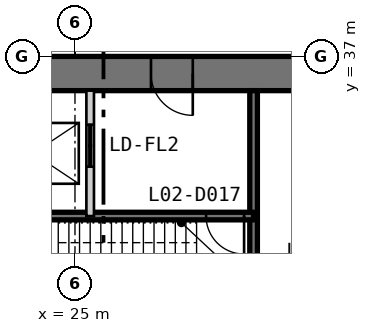
"""IFC4 building model, lengths in metres.
Left out: names, types, materials, properties, quantities, classifications, styles, units other than length and angle.
Written with IfcOpenShell. Run it as: python <this file> out.ifc"""

import sys

from ifc_helpers import new_model, si_unit, direction, frame, frame_2d, origin, place, context, subcontext, project, spatial, polyline, rectangle, outline, extrude, element, fill, save


model = new_model("IFC4")
c1 = context("Model", 3, precision=1e-05, world=origin(), true_north=direction((0.0, 1.0)))
c2 = subcontext(c1, "Body", "Model", "MODEL_VIEW")
j1 = project(units=[si_unit("LENGTHUNIT", "METRE"), si_unit("PLANEANGLEUNIT", "RADIAN")], contexts=[c1])
p1 = place(None, origin())
s1 = spatial("IfcSite", under=j1, at=p1, CompositionType="ELEMENT")
p2 = place(p1, origin())
s2 = spatial("IfcBuilding", under=s1, at=p2, CompositionType="ELEMENT")
p3 = place(p2, frame((0.0, 0.0, 11.8)))
s3 = spatial("IfcBuildingStorey", under=s2, at=p3, CompositionType="ELEMENT", Elevation=11.8)
p4 = place(p3, frame((37.0, 36.55, 0.0), z_axis=(0.0, 0.0, 1.0), x_axis=(-1.0, 0.0, 0.0)))
e1 = element("IfcWall", 1, at=p4, inside=s3, PredefinedType="SHEAR", context=c2, shape_type="SweptSolid", body=[
    extrude(outline(polyline([(0.0, -0.45), (24.0, -0.45), (23.1, 0.45), (0.9, 0.45), (0.0, -0.45)])), origin(), (0.0, 0.0, 1.0), 4.8),
])
p5 = place(p4, frame((4.9, 0.0, 0.0)))
e2 = element("IfcOpeningElement", 2, at=p5, cuts=e1, PredefinedType="OPENING", context=c2, shape_type="SweptSolid", body=[
    extrude(rectangle(XDim=1.0, YDim=2.2, at=frame_2d((0.5, 1.1))), frame((0.0, 0.46, 0.0), z_axis=(0.0, -1.0, 0.0), x_axis=(1.0, 0.0, 0.0)), (0.0, 0.0, 1.0), 0.92),
])
p6 = place(p4, frame((8.9, 0.0, 0.0)))
e3 = element("IfcOpeningElement", 3, at=p6, cuts=e1, PredefinedType="OPENING", context=c2, shape_type="SweptSolid", body=[
    extrude(rectangle(XDim=1.1, YDim=2.2, at=frame_2d((0.55, 1.1))), frame((0.0, 0.46, 0.0), z_axis=(0.0, -1.0, 0.0), x_axis=(1.0, 0.0, 0.0)), (0.0, 0.0, 1.0), 0.92),
])
p7 = place(p4, frame((15.05, 0.0, 0.0)))
e4 = element("IfcOpeningElement", 4, at=p7, cuts=e1, PredefinedType="OPENING", context=c2, shape_type="SweptSolid", body=[
    extrude(rectangle(XDim=0.9, YDim=2.2, at=frame_2d((0.45, 1.1))), frame((0.0, 0.46, 0.0), z_axis=(0.0, -1.0, 0.0), x_axis=(1.0, 0.0, 0.0)), (0.0, 0.0, 1.0), 0.92),
])
p8 = place(p4, frame((17.9, 0.0, 0.0)))
e5 = element("IfcOpeningElement", 5, at=p8, cuts=e1, PredefinedType="OPENING", context=c2, shape_type="SweptSolid", body=[
    extrude(rectangle(XDim=1.0, YDim=2.2, at=frame_2d((0.5, 1.1))), frame((0.0, 0.46, 0.0), z_axis=(0.0, -1.0, 0.0), x_axis=(1.0, 0.0, 0.0)), (0.0, 0.0, 1.0), 0.92),
])
p9 = place(p4, frame((21.4, 0.0, 0.0)))
e6 = element("IfcOpeningElement", 6, at=p9, cuts=e1, PredefinedType="OPENING", context=c2, shape_type="SweptSolid", body=[
    extrude(rectangle(XDim=1.0, YDim=2.2, at=frame_2d((0.5, 1.1))), frame((0.0, 0.46, 0.0), z_axis=(0.0, -1.0, 0.0), x_axis=(1.0, 0.0, 0.0)), (0.0, 0.0, 1.0), 0.92),
])
p10 = place(p3, frame((29.7, 36.1, 0.0), z_axis=(0.0, 0.0, 1.0), x_axis=(0.0, -1.0, 0.0)))
e7 = element("IfcWall", 7, at=p10, inside=s3, PredefinedType="SOLIDWALL", context=c2, shape_type="SweptSolid", body=[
    extrude(rectangle(XDim=16.1, YDim=0.2, at=frame_2d((8.05, 0.0))), origin(), (0.0, 0.0, 1.0), 4.6),
])
p11 = place(p3, frame((29.7, 32.8, 0.0), z_axis=(0.0, 0.0, 1.0), x_axis=(-1.0, 0.0, 0.0)))
e8 = element("IfcWall", 8, at=p11, inside=s3, PredefinedType="SOLIDWALL", context=c2, shape_type="SweptSolid", body=[
    extrude(rectangle(XDim=9.4, YDim=0.2, at=frame_2d((4.7, 0.0))), origin(), (0.0, 0.0, 1.0), 4.6),
])
p12 = place(p11, frame((0.25, 0.0, 0.0)))
e9 = element("IfcOpeningElement", 9, at=p12, cuts=e8, PredefinedType="OPENING", context=c2, shape_type="SweptSolid", body=[
    extrude(rectangle(XDim=1.0, YDim=2.2, at=frame_2d((0.5, 1.1))), frame((0.0, 0.11, 0.0), z_axis=(0.0, -1.0, 0.0), x_axis=(1.0, 0.0, 0.0)), (0.0, 0.0, 1.0), 0.22),
])
p13 = place(p3, frame((25.4, 36.1, 0.0), z_axis=(0.0, 0.0, 1.0), x_axis=(0.0, -1.0, 0.0)))
e10 = element("IfcWall", 10, at=p13, inside=s3, PredefinedType="PARTITIONING", context=c2, shape_type="SweptSolid", body=[
    extrude(rectangle(XDim=3.3, YDim=0.2, at=frame_2d((1.65, 0.0))), origin(), (0.0, 0.0, 1.0), 4.6),
])
p14 = place(p13, frame((0.9, 0.0, 0.0)))
e11 = element("IfcOpeningElement", 11, at=p14, cuts=e10, PredefinedType="OPENING", context=c2, shape_type="SweptSolid", body=[
    extrude(rectangle(XDim=1.1, YDim=2.2, at=frame_2d((0.55, 1.1))), frame((0.0, 0.11, 0.0), z_axis=(0.0, -1.0, 0.0), x_axis=(1.0, 0.0, 0.0)), (0.0, 0.0, 1.0), 0.22),
])
p15 = place(p6, origin())
e12 = element("IfcDoor", 12, at=p15, inside=s3, OperationType="SINGLE_SWING_LEFT", PredefinedType="DOOR", context=c2, shape_type="SweptSolid", body=[
    extrude(rectangle(XDim=1.1, YDim=2.2, at=frame_2d((0.55, 1.1))), frame((0.0, 0.025, 0.0), z_axis=(0.0, -1.0, 0.0), x_axis=(1.0, 0.0, 0.0)), (0.0, 0.0, 1.0), 0.05),
    extrude(outline(polyline([(0.0, 0.0), (0.04, 0.0), (0.04, 2.16), (1.06, 2.16), (1.06, 0.0), (1.1, 0.0), (1.1, 2.2), (0.0, 2.2), (0.0, 0.0)])), frame((0.0, 0.3, 0.0), z_axis=(0.0, -1.0, 0.0), x_axis=(1.0, 0.0, 0.0)), (0.0, 0.0, 1.0), 0.6),
])
fill(e3, e12)
p16 = place(p12, origin())
e13 = element("IfcDoor", 13, at=p16, inside=s3, OperationType="SINGLE_SWING_LEFT", PredefinedType="DOOR", context=c2, shape_type="SweptSolid", body=[
    extrude(rectangle(XDim=1.0, YDim=2.2, at=frame_2d((0.5, 1.1))), frame((0.0, 0.025, 0.0), z_axis=(0.0, -1.0, 0.0), x_axis=(1.0, 0.0, 0.0)), (0.0, 0.0, 1.0), 0.05),
])
fill(e9, e13)
p17 = place(p14, origin())
e14 = element("IfcDoor", 14, at=p17, inside=s3, OperationType="DOUBLE_DOOR_SLIDING", PredefinedType="DOOR", context=c2, shape_type="SweptSolid", body=[
    extrude(rectangle(XDim=1.1, YDim=2.2, at=frame_2d((0.55, 1.1))), frame((0.0, 0.025, 0.0), z_axis=(0.0, -1.0, 0.0), x_axis=(1.0, 0.0, 0.0)), (0.0, 0.0, 1.0), 0.05),
])
fill(e11, e14)
save(model, sys.argv[1])
